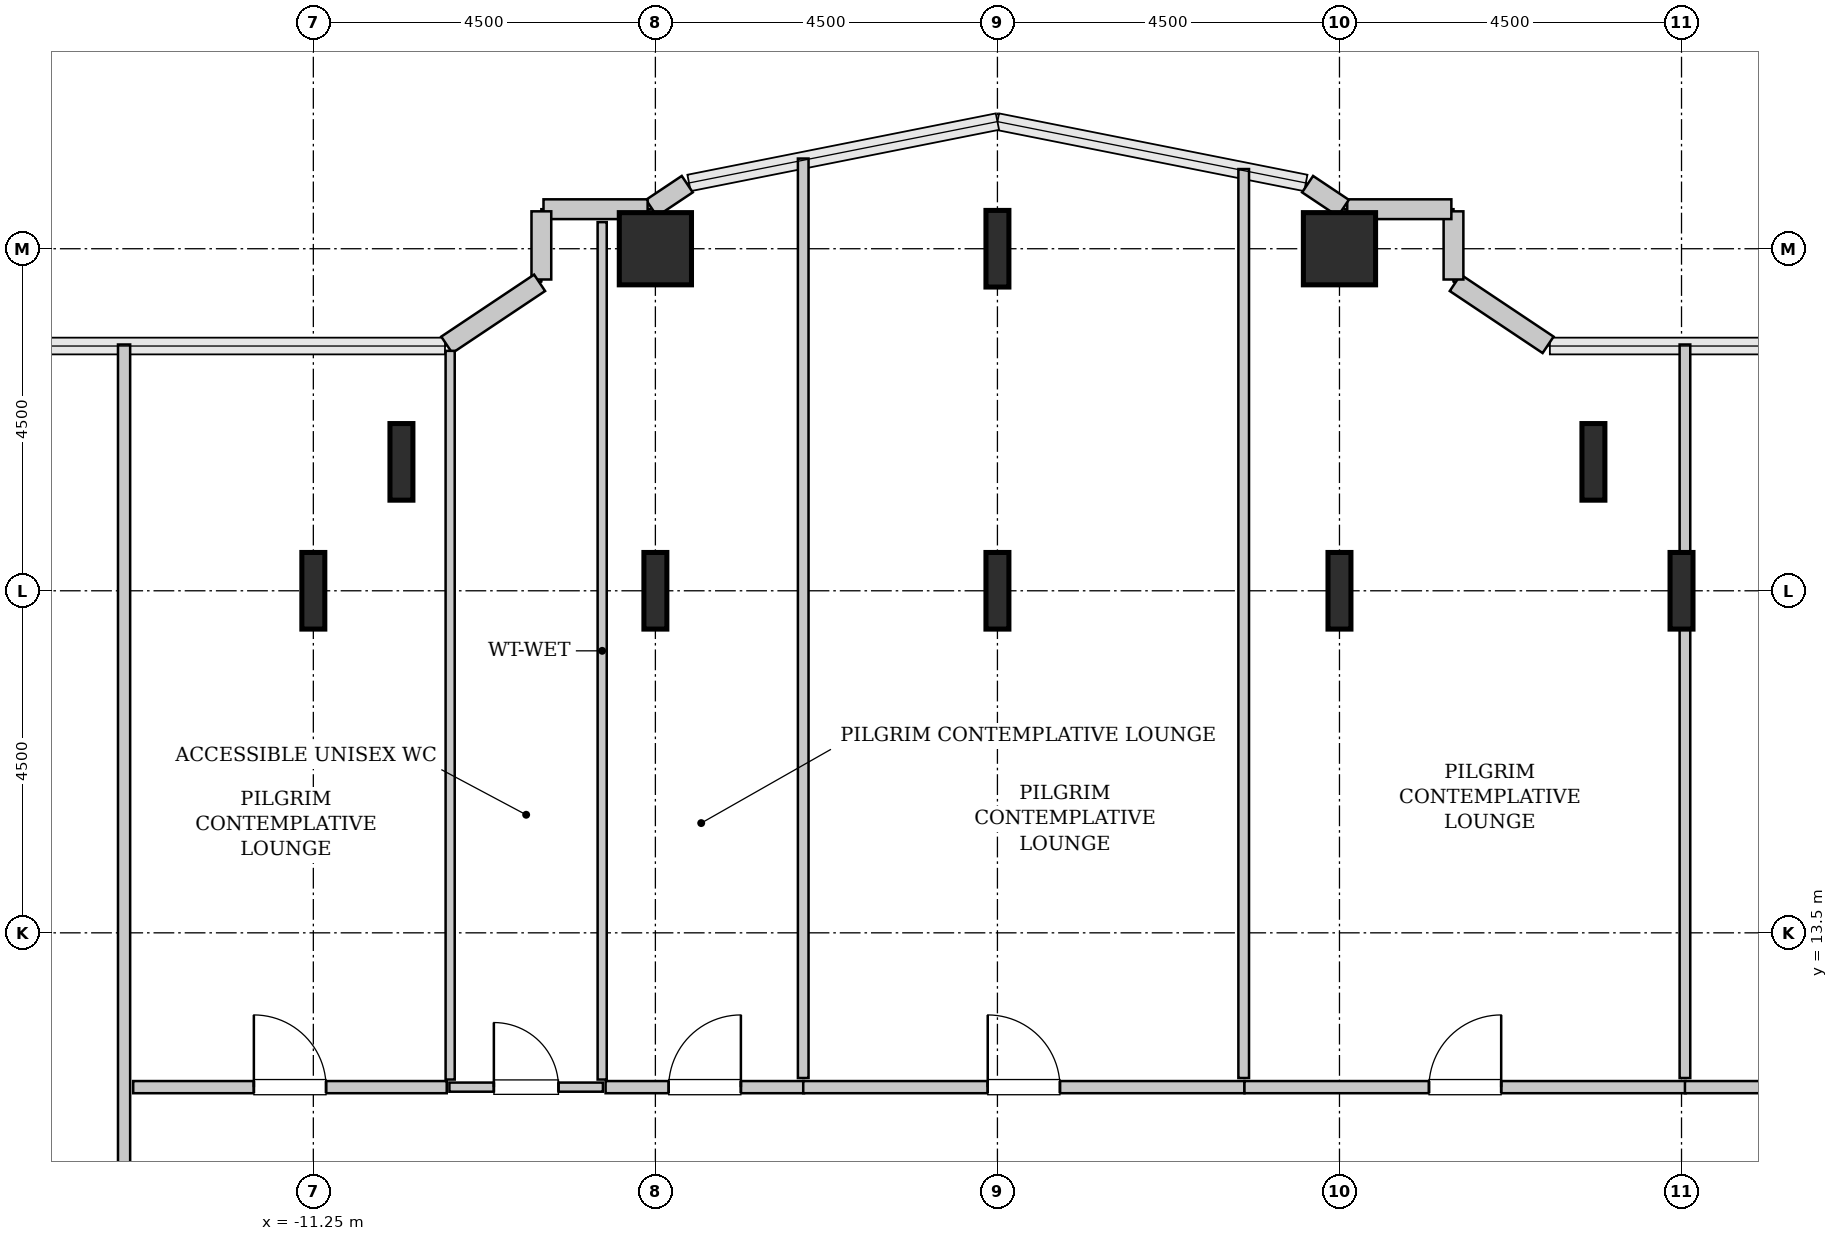
"""IFC4 building model, lengths in metres.
Left out: names, types, materials, properties, quantities, classifications, styles, units other than length and angle.
Written with IfcOpenShell. Run it as: python <this file> out.ifc"""

import sys

from ifc_helpers import new_model, si_unit, direction, frame, frame_2d, origin, origin_2d, place, context, subcontext, project, spatial, rectangle, hollow_rectangle, i_section, extrude, source, transform, mapped, element, fill, save


model = new_model("IFC4")
c1 = context("Model", 3, precision=1e-05, world=origin(), true_north=direction((0.0, 1.0)))
c2 = subcontext(c1, "Body", "Model", "MODEL_VIEW")
j1 = project(units=[si_unit("LENGTHUNIT", "METRE"), si_unit("PLANEANGLEUNIT", "RADIAN")], contexts=[c1])
p1 = place(None, origin())
s1 = spatial("IfcSite", under=j1, at=p1, CompositionType="ELEMENT")
p2 = place(p1, origin())
s2 = spatial("IfcBuilding", under=s1, at=p2, CompositionType="ELEMENT")
p3 = place(p2, frame((0.0, 0.0, 48.2)))
s3 = spatial("IfcBuildingStorey", under=s2, at=p3, CompositionType="ELEMENT", Elevation=48.2)
m1 = source(origin(), c2, "Body", "SweptSolid", [
    extrude(i_section(OverallWidth=0.302, OverallDepth=1.008, WebThickness=0.021, FlangeThickness=0.04, FilletRadius=0.03, at=origin_2d()), origin(), (0.0, 0.0, 1.0), 3.8),
])
for number, where, z_axis, x_axis in (
    (1, (-11.25, 18.0, 0.0), (0.0, 0.0, 1.0), (1.0, 0.0, 0.0)),
    (2, (-10.091, 19.696, 0.0), (0.0, 0.0, 1.0), (1.0, 0.0, 0.0)),
    (3, (-6.75, 18.0, 0.0), (0.0, 0.0, 1.0), (1.0, 0.0, 0.0)),
):
    element("IfcColumn", number, at=place(p3, frame(where, z_axis=z_axis, x_axis=x_axis)), inside=s3, PredefinedType="COLUMN", context=c2, shape_type="MappedRepresentation", body=[
        mapped(m1, transform((0.0, 0.0, 0.0), x_axis=(1.0, 0.0, 0.0), y_axis=(0.0, 1.0, 0.0), z_axis=(0.0, 0.0, 1.0), scale=1.0)),
    ])
m2 = source(origin(), c2, "Body", "SweptSolid", [
    extrude(hollow_rectangle(XDim=0.95, YDim=0.95, WallThickness=0.045, InnerFilletRadius=0.045, OuterFilletRadius=0.09, at=origin_2d()), origin(), (0.0, 0.0, 1.0), 3.8),
])
p4 = place(p3, frame((-6.75, 22.5, 0.0), z_axis=(0.0, 0.0, 1.0), x_axis=(1.0, 0.0, 0.0)))
e4 = element("IfcColumn", 4, at=p4, inside=s3, PredefinedType="COLUMN", context=c2, shape_type="MappedRepresentation", body=[
    mapped(m2, transform((0.0, 0.0, 0.0), x_axis=(1.0, 0.0, 0.0), y_axis=(0.0, 1.0, 0.0), z_axis=(0.0, 0.0, 1.0), scale=1.0)),
])
for number, where, z_axis, x_axis in (
    (5, (-2.25, 18.0, 0.0), (0.0, 0.0, 1.0), (1.0, 0.0, 0.0)),
    (6, (-2.25, 22.5, 0.0), (0.0, 0.0, 1.0), (1.0, 0.0, 0.0)),
    (7, (2.25, 18.0, 0.0), (0.0, 0.0, 1.0), (1.0, 0.0, 0.0)),
):
    element("IfcColumn", number, at=place(p3, frame(where, z_axis=z_axis, x_axis=x_axis)), inside=s3, PredefinedType="COLUMN", context=c2, shape_type="MappedRepresentation", body=[
        mapped(m1, transform((0.0, 0.0, 0.0), x_axis=(1.0, 0.0, 0.0), y_axis=(0.0, 1.0, 0.0), z_axis=(0.0, 0.0, 1.0), scale=1.0)),
    ])
p5 = place(p3, frame((2.25, 22.5, 0.0), z_axis=(0.0, 0.0, 1.0), x_axis=(1.0, 0.0, 0.0)))
e8 = element("IfcColumn", 8, at=p5, inside=s3, PredefinedType="COLUMN", context=c2, shape_type="MappedRepresentation", body=[
    mapped(m2, transform((0.0, 0.0, 0.0), x_axis=(1.0, 0.0, 0.0), y_axis=(0.0, 1.0, 0.0), z_axis=(0.0, 0.0, 1.0), scale=1.0)),
])
for number, where, z_axis, x_axis in (
    (9, (5.591, 19.696, 0.0), (0.0, 0.0, 1.0), (1.0, 0.0, 0.0)),
    (10, (6.75, 18.0, 0.0), (0.0, 0.0, 1.0), (1.0, 0.0, 0.0)),
):
    element("IfcColumn", number, at=place(p3, frame(where, z_axis=z_axis, x_axis=x_axis)), inside=s3, PredefinedType="COLUMN", context=c2, shape_type="MappedRepresentation", body=[
        mapped(m1, transform((0.0, 0.0, 0.0), x_axis=(1.0, 0.0, 0.0), y_axis=(0.0, 1.0, 0.0), z_axis=(0.0, 0.0, 1.0), scale=1.0)),
    ])
m3 = source(origin(), c2, "Body", "SweptSolid", [
    extrude(rectangle(XDim=1.469, YDim=0.26, at=frame_2d((0.734, 0.0))), origin(), (0.0, 0.0, 1.0), 3.55),
])
p6 = place(p3, frame((4.995, 21.236, 0.0), z_axis=(0.0, 0.0, 1.0), x_axis=(-0.831461760506, 0.555581983884, 0.0)))
e11 = element("IfcWall", 11, at=p6, inside=s3, PredefinedType="SOLIDWALL", context=c2, shape_type="MappedRepresentation", body=[
    mapped(m3, transform((0.0, 0.0, 0.0), x_axis=(1.0, 0.0, 0.0), y_axis=(0.0, 1.0, 0.0), z_axis=(0.0, 0.0, 1.0), scale=1.0)),
])
m4 = source(origin(), c2, "Body", "SweptSolid", [
    extrude(rectangle(XDim=0.897, YDim=0.26, at=frame_2d((0.448, 0.0))), origin(), (0.0, 0.0, 1.0), 3.55),
])
p7 = place(p3, frame((3.75, 22.095, 0.0), z_axis=(0.0, 0.0, 1.0), x_axis=(0.0, 1.0, 0.0)))
e12 = element("IfcWall", 12, at=p7, inside=s3, PredefinedType="SOLIDWALL", context=c2, shape_type="MappedRepresentation", body=[
    mapped(m4, transform((0.0, 0.0, 0.0), x_axis=(1.0, 0.0, 0.0), y_axis=(0.0, 1.0, 0.0), z_axis=(0.0, 0.0, 1.0), scale=1.0)),
])
m5 = source(origin(), c2, "Body", "SweptSolid", [
    extrude(rectangle(XDim=1.37, YDim=0.26, at=frame_2d((0.685, 0.0))), origin(), (0.0, 0.0, 1.0), 3.55),
])
p8 = place(p3, frame((3.722, 23.02, 0.0), z_axis=(0.0, 0.0, 1.0), x_axis=(-1.0, 0.0, 0.0)))
e13 = element("IfcWall", 13, at=p8, inside=s3, PredefinedType="SOLIDWALL", context=c2, shape_type="MappedRepresentation", body=[
    mapped(m5, transform((0.0, 0.0, 0.0), x_axis=(1.0, 0.0, 0.0), y_axis=(0.0, 1.0, 0.0), z_axis=(0.0, 0.0, 1.0), scale=1.0)),
])
m6 = source(origin(), c2, "Body", "SweptSolid", [
    extrude(rectangle(XDim=0.565, YDim=0.26, at=frame_2d((0.283, 0.0))), origin(), (0.0, 0.0, 1.0), 3.55),
])
for number, where, z_axis, x_axis in (
    (14, (2.301, 23.036, 0.0), (0.0, 0.0, 1.0), (-0.832, 0.555, 0.0)),
    (15, (-6.331, 23.35, 0.0), (0.0, 0.0, 1.0), (-0.832, -0.555, 0.0)),
):
    element("IfcWall", number, at=place(p3, frame(where, z_axis=z_axis, x_axis=x_axis)), inside=s3, PredefinedType="SOLIDWALL", context=c2, shape_type="MappedRepresentation", body=[
        mapped(m6, transform((0.0, 0.0, 0.0), x_axis=(1.0, 0.0, 0.0), y_axis=(0.0, 1.0, 0.0), z_axis=(0.0, 0.0, 1.0), scale=1.0)),
    ])
p9 = place(p3, frame((-6.852, 23.02, 0.0), z_axis=(0.0, 0.0, 1.0), x_axis=(-1.0, 0.0, 0.0)))
e16 = element("IfcWall", 16, at=p9, inside=s3, PredefinedType="SOLIDWALL", context=c2, shape_type="MappedRepresentation", body=[
    mapped(m5, transform((0.0, 0.0, 0.0), x_axis=(1.0, 0.0, 0.0), y_axis=(0.0, 1.0, 0.0), z_axis=(0.0, 0.0, 1.0), scale=1.0)),
])
p10 = place(p3, frame((-8.25, 22.992, 0.0), z_axis=(0.0, 0.0, 1.0), x_axis=(0.0, -1.0, 0.0)))
e17 = element("IfcWall", 17, at=p10, inside=s3, PredefinedType="SOLIDWALL", context=c2, shape_type="MappedRepresentation", body=[
    mapped(m4, transform((0.0, 0.0, 0.0), x_axis=(1.0, 0.0, 0.0), y_axis=(0.0, 1.0, 0.0), z_axis=(0.0, 0.0, 1.0), scale=1.0)),
])
p11 = place(p3, frame((-8.273, 22.052, 0.0), z_axis=(0.0, 0.0, 1.0), x_axis=(-0.831461760506, -0.555581983884, 0.0)))
e18 = element("IfcWall", 18, at=p11, inside=s3, PredefinedType="SOLIDWALL", context=c2, shape_type="MappedRepresentation", body=[
    mapped(m3, transform((0.0, 0.0, 0.0), x_axis=(1.0, 0.0, 0.0), y_axis=(0.0, 1.0, 0.0), z_axis=(0.0, 0.0, 1.0), scale=1.0)),
])
m7 = source(origin(), c2, "Body", "SweptSolid", [
    extrude(rectangle(XDim=2.02, YDim=0.12, at=frame_2d((1.01, 0.0))), origin(), (0.0, 0.0, 1.0), 3.535),
])
p12 = place(p3, frame((-9.46, 11.47, 0.0), z_axis=(0.0, 0.0, 1.0), x_axis=(1.0, 0.0, 0.0)))
e19 = element("IfcWall", 19, at=p12, inside=s3, PredefinedType="PLUMBINGWALL", context=c2, shape_type="MappedRepresentation", body=[
    mapped(m7, transform((0.0, 0.0, 0.0), x_axis=(1.0, 0.0, 0.0), y_axis=(0.0, 1.0, 0.0), z_axis=(0.0, 0.0, 1.0), scale=1.0)),
])
p13 = place(p12, frame((0.585, 0.0, 0.0)))
e20 = element("IfcOpeningElement", 20, at=p13, cuts=e19, PredefinedType="OPENING", context=c2, shape_type="SweptSolid", body=[
    extrude(rectangle(XDim=0.85, YDim=2.1, at=frame_2d((0.425, 1.05))), frame((0.0, 0.07, 0.0), z_axis=(0.0, -1.0, 0.0), x_axis=(1.0, 0.0, 0.0)), (0.0, 0.0, 1.0), 0.14),
])
m8 = source(origin(), c2, "Body", "SweptSolid", [
    extrude(rectangle(XDim=11.28, YDim=0.12, at=frame_2d((5.64, 0.0))), origin(), (0.0, 0.0, 1.0), 3.535),
])
p14 = place(p3, frame((-7.45, 11.57, 0.0), z_axis=(0.0, 0.0, 1.0), x_axis=(0.0, 1.0, 0.0)))
e21 = element("IfcWall", 21, at=p14, inside=s3, PredefinedType="PLUMBINGWALL", context=c2, shape_type="MappedRepresentation", body=[
    mapped(m8, transform((0.0, 0.0, 0.0), x_axis=(1.0, 0.0, 0.0), y_axis=(0.0, 1.0, 0.0), z_axis=(0.0, 0.0, 1.0), scale=1.0)),
])
m9 = source(origin(), c2, "Body", "SweptSolid", [
    extrude(rectangle(XDim=9.587, YDim=0.12, at=frame_2d((4.793, 0.0))), origin(), (0.0, 0.0, 1.0), 3.535),
])
p15 = place(p3, frame((-9.45, 11.57, 0.0), z_axis=(0.0, 0.0, 1.0), x_axis=(0.0, 1.0, 0.0)))
e22 = element("IfcWall", 22, at=p15, inside=s3, PredefinedType="PLUMBINGWALL", context=c2, shape_type="MappedRepresentation", body=[
    mapped(m9, transform((0.0, 0.0, 0.0), x_axis=(1.0, 0.0, 0.0), y_axis=(0.0, 1.0, 0.0), z_axis=(0.0, 0.0, 1.0), scale=1.0)),
])
m10 = source(origin(), c2, "Body", "SweptSolid", [
    extrude(rectangle(XDim=12.845, YDim=0.16, at=frame_2d((6.422, 0.0))), origin(), (0.0, 0.0, 1.0), 3.535),
])
p16 = place(p3, frame((-13.74, 8.395, 0.0), z_axis=(0.0, 0.0, 1.0), x_axis=(0.0, 1.0, 0.0)))
e23 = element("IfcWall", 23, at=p16, inside=s3, PredefinedType="PARTITIONING", context=c2, shape_type="MappedRepresentation", body=[
    mapped(m10, transform((0.0, 0.0, 0.0), x_axis=(1.0, 0.0, 0.0), y_axis=(0.0, 1.0, 0.0), z_axis=(0.0, 0.0, 1.0), scale=1.0)),
])
p17 = place(p16, frame((1.083, 0.0, 0.0)))
e24 = element("IfcOpeningElement", 24, at=p17, cuts=e23, PredefinedType="OPENING", context=c2, shape_type="SweptSolid", body=[
    extrude(rectangle(XDim=0.95, YDim=2.1, at=frame_2d((0.475, 1.05))), frame((0.0, 0.09, 0.0), z_axis=(0.0, -1.0, 0.0), x_axis=(1.0, 0.0, 0.0)), (0.0, 0.0, 1.0), 0.18),
])
m11 = source(origin(), c2, "Body", "SweptSolid", [
    extrude(rectangle(XDim=4.125, YDim=0.16, at=frame_2d((2.062, 0.0))), origin(), (0.0, 0.0, 1.0), 3.535),
])
p18 = place(p3, frame((-13.62, 11.47, 0.0), z_axis=(0.0, 0.0, 1.0), x_axis=(1.0, 0.0, 0.0)))
e25 = element("IfcWall", 25, at=p18, inside=s3, PredefinedType="PARTITIONING", context=c2, shape_type="MappedRepresentation", body=[
    mapped(m11, transform((0.0, 0.0, 0.0), x_axis=(1.0, 0.0, 0.0), y_axis=(0.0, 1.0, 0.0), z_axis=(0.0, 0.0, 1.0), scale=1.0)),
])
p19 = place(p18, frame((1.587, 0.0, 0.0)))
e26 = element("IfcOpeningElement", 26, at=p19, cuts=e25, PredefinedType="OPENING", context=c2, shape_type="SweptSolid", body=[
    extrude(rectangle(XDim=0.95, YDim=2.1, at=frame_2d((0.475, 1.05))), frame((0.0, 0.09, 0.0), z_axis=(0.0, -1.0, 0.0), x_axis=(1.0, 0.0, 0.0)), (0.0, 0.0, 1.0), 0.18),
])
m12 = source(origin(), c2, "Body", "SweptSolid", [
    extrude(rectangle(XDim=2.61, YDim=0.16, at=frame_2d((1.305, 0.0))), origin(), (0.0, 0.0, 1.0), 3.535),
])
p20 = place(p3, frame((-7.405, 11.47, 0.0), z_axis=(0.0, 0.0, 1.0), x_axis=(1.0, 0.0, 0.0)))
e27 = element("IfcWall", 27, at=p20, inside=s3, PredefinedType="PARTITIONING", context=c2, shape_type="MappedRepresentation", body=[
    mapped(m12, transform((0.0, 0.0, 0.0), x_axis=(1.0, 0.0, 0.0), y_axis=(0.0, 1.0, 0.0), z_axis=(0.0, 0.0, 1.0), scale=1.0)),
])
p21 = place(p20, frame((0.83, 0.0, 0.0)))
e28 = element("IfcOpeningElement", 28, at=p21, cuts=e27, PredefinedType="OPENING", context=c2, shape_type="SweptSolid", body=[
    extrude(rectangle(XDim=0.95, YDim=2.1, at=frame_2d((0.475, 1.05))), frame((0.0, 0.09, 0.0), z_axis=(0.0, -1.0, 0.0), x_axis=(1.0, 0.0, 0.0)), (0.0, 0.0, 1.0), 0.18),
])
m13 = source(origin(), c2, "Body", "SweptSolid", [
    extrude(rectangle(XDim=12.096, YDim=0.14, at=frame_2d((6.048, 0.0))), origin(), (0.0, 0.0, 1.0), 3.535),
])
p22 = place(p3, frame((-4.805, 11.59, 0.0), z_axis=(0.0, 0.0, 1.0), x_axis=(0.0, 1.0, 0.0)))
e29 = element("IfcWall", 29, at=p22, inside=s3, PredefinedType="PARTITIONING", context=c2, shape_type="MappedRepresentation", body=[
    mapped(m13, transform((0.0, 0.0, 0.0), x_axis=(1.0, 0.0, 0.0), y_axis=(0.0, 1.0, 0.0), z_axis=(0.0, 0.0, 1.0), scale=1.0)),
])
m14 = source(origin(), c2, "Body", "SweptSolid", [
    extrude(rectangle(XDim=5.805, YDim=0.16, at=frame_2d((2.902, 0.0))), origin(), (0.0, 0.0, 1.0), 3.535),
])
p23 = place(p3, frame((-4.805, 11.47, 0.0), z_axis=(0.0, 0.0, 1.0), x_axis=(1.0, 0.0, 0.0)))
e30 = element("IfcWall", 30, at=p23, inside=s3, PredefinedType="PARTITIONING", context=c2, shape_type="MappedRepresentation", body=[
    mapped(m14, transform((0.0, 0.0, 0.0), x_axis=(1.0, 0.0, 0.0), y_axis=(0.0, 1.0, 0.0), z_axis=(0.0, 0.0, 1.0), scale=1.0)),
])
p24 = place(p23, frame((2.427, 0.0, 0.0)))
e31 = element("IfcOpeningElement", 31, at=p24, cuts=e30, PredefinedType="OPENING", context=c2, shape_type="SweptSolid", body=[
    extrude(rectangle(XDim=0.95, YDim=2.1, at=frame_2d((0.475, 1.05))), frame((0.0, 0.09, 0.0), z_axis=(0.0, -1.0, 0.0), x_axis=(1.0, 0.0, 0.0)), (0.0, 0.0, 1.0), 0.18),
])
m15 = source(origin(), c2, "Body", "SweptSolid", [
    extrude(rectangle(XDim=11.958, YDim=0.14, at=frame_2d((5.979, 0.0))), origin(), (0.0, 0.0, 1.0), 3.535),
])
p25 = place(p3, frame((0.99, 11.59, 0.0), z_axis=(0.0, 0.0, 1.0), x_axis=(0.0, 1.0, 0.0)))
e32 = element("IfcWall", 32, at=p25, inside=s3, PredefinedType="PARTITIONING", context=c2, shape_type="MappedRepresentation", body=[
    mapped(m15, transform((0.0, 0.0, 0.0), x_axis=(1.0, 0.0, 0.0), y_axis=(0.0, 1.0, 0.0), z_axis=(0.0, 0.0, 1.0), scale=1.0)),
])
p26 = place(p3, frame((1.0, 11.47, 0.0), z_axis=(0.0, 0.0, 1.0), x_axis=(1.0, 0.0, 0.0)))
e33 = element("IfcWall", 33, at=p26, inside=s3, PredefinedType="PARTITIONING", context=c2, shape_type="MappedRepresentation", body=[
    mapped(m14, transform((0.0, 0.0, 0.0), x_axis=(1.0, 0.0, 0.0), y_axis=(0.0, 1.0, 0.0), z_axis=(0.0, 0.0, 1.0), scale=1.0)),
])
p27 = place(p26, frame((2.427, 0.0, 0.0)))
e34 = element("IfcOpeningElement", 34, at=p27, cuts=e33, PredefinedType="OPENING", context=c2, shape_type="SweptSolid", body=[
    extrude(rectangle(XDim=0.95, YDim=2.1, at=frame_2d((0.475, 1.05))), frame((0.0, 0.09, 0.0), z_axis=(0.0, -1.0, 0.0), x_axis=(1.0, 0.0, 0.0)), (0.0, 0.0, 1.0), 0.18),
])
m16 = source(origin(), c2, "Body", "SweptSolid", [
    extrude(rectangle(XDim=9.65, YDim=0.14, at=frame_2d((4.825, 0.0))), origin(), (0.0, 0.0, 1.0), 3.535),
])
p28 = place(p3, frame((6.795, 11.59, 0.0), z_axis=(0.0, 0.0, 1.0), x_axis=(0.0, 1.0, 0.0)))
e35 = element("IfcWall", 35, at=p28, inside=s3, PredefinedType="PARTITIONING", context=c2, shape_type="MappedRepresentation", body=[
    mapped(m16, transform((0.0, 0.0, 0.0), x_axis=(1.0, 0.0, 0.0), y_axis=(0.0, 1.0, 0.0), z_axis=(0.0, 0.0, 1.0), scale=1.0)),
])
m17 = source(origin(), c2, "Body", "SweptSolid", [
    extrude(rectangle(XDim=6.825, YDim=0.16, at=frame_2d((3.413, 0.0))), origin(), (0.0, 0.0, 1.0), 3.535),
])
p29 = place(p3, frame((6.795, 11.47, 0.0), z_axis=(0.0, 0.0, 1.0), x_axis=(1.0, 0.0, 0.0)))
e36 = element("IfcWall", 36, at=p29, inside=s3, PredefinedType="PARTITIONING", context=c2, shape_type="MappedRepresentation", body=[
    mapped(m17, transform((0.0, 0.0, 0.0), x_axis=(1.0, 0.0, 0.0), y_axis=(0.0, 1.0, 0.0), z_axis=(0.0, 0.0, 1.0), scale=1.0)),
])
p30 = place(p29, frame((2.938, 0.0, 0.0)))
e37 = element("IfcOpeningElement", 37, at=p30, cuts=e36, PredefinedType="OPENING", context=c2, shape_type="SweptSolid", body=[
    extrude(rectangle(XDim=0.95, YDim=2.1, at=frame_2d((0.475, 1.05))), frame((0.0, 0.09, 0.0), z_axis=(0.0, -1.0, 0.0), x_axis=(1.0, 0.0, 0.0)), (0.0, 0.0, 1.0), 0.18),
])
m18 = source(origin(), c2, "Body", "SweptSolid", [
    extrude(rectangle(XDim=0.85, YDim=2.1, at=frame_2d((0.425, 1.05))), frame((0.0, 0.025, 0.0), z_axis=(0.0, -1.0, 0.0), x_axis=(1.0, 0.0, 0.0)), (0.0, 0.0, 1.0), 0.05),
])
p31 = place(p13, origin())
e38 = element("IfcDoor", 38, at=p31, inside=s3, OperationType="SINGLE_SWING_LEFT", PredefinedType="DOOR", context=c2, shape_type="MappedRepresentation", body=[
    mapped(m18, transform((0.0, 0.0, 0.0), x_axis=(1.0, 0.0, 0.0), y_axis=(0.0, 1.0, 0.0), z_axis=(0.0, 0.0, 1.0), scale=1.0)),
])
fill(e20, e38)
m19 = source(origin(), c2, "Body", "SweptSolid", [
    extrude(rectangle(XDim=0.95, YDim=2.1, at=frame_2d((0.475, 1.05))), frame((0.0, 0.025, 0.0), z_axis=(0.0, -1.0, 0.0), x_axis=(1.0, 0.0, 0.0)), (0.0, 0.0, 1.0), 0.05),
])
p32 = place(p19, origin())
e39 = element("IfcDoor", 39, at=p32, inside=s3, OperationType="SINGLE_SWING_LEFT", PredefinedType="DOOR", context=c2, shape_type="MappedRepresentation", body=[
    mapped(m19, transform((0.0, 0.0, 0.0), x_axis=(1.0, 0.0, 0.0), y_axis=(0.0, 1.0, 0.0), z_axis=(0.0, 0.0, 1.0), scale=1.0)),
])
fill(e26, e39)
p33 = place(p21, origin())
e40 = element("IfcDoor", 40, at=p33, inside=s3, OperationType="SINGLE_SWING_RIGHT", PredefinedType="DOOR", context=c2, shape_type="MappedRepresentation", body=[
    mapped(m19, transform((0.0, 0.0, 0.0), x_axis=(1.0, 0.0, 0.0), y_axis=(0.0, 1.0, 0.0), z_axis=(0.0, 0.0, 1.0), scale=1.0)),
])
fill(e28, e40)
p34 = place(p24, origin())
e41 = element("IfcDoor", 41, at=p34, inside=s3, OperationType="SINGLE_SWING_LEFT", PredefinedType="DOOR", context=c2, shape_type="MappedRepresentation", body=[
    mapped(m19, transform((0.0, 0.0, 0.0), x_axis=(1.0, 0.0, 0.0), y_axis=(0.0, 1.0, 0.0), z_axis=(0.0, 0.0, 1.0), scale=1.0)),
])
fill(e31, e41)
p35 = place(p27, origin())
e42 = element("IfcDoor", 42, at=p35, inside=s3, OperationType="SINGLE_SWING_RIGHT", PredefinedType="DOOR", context=c2, shape_type="MappedRepresentation", body=[
    mapped(m19, transform((0.0, 0.0, 0.0), x_axis=(1.0, 0.0, 0.0), y_axis=(0.0, 1.0, 0.0), z_axis=(0.0, 0.0, 1.0), scale=1.0)),
])
fill(e34, e42)
save(model, sys.argv[1])
